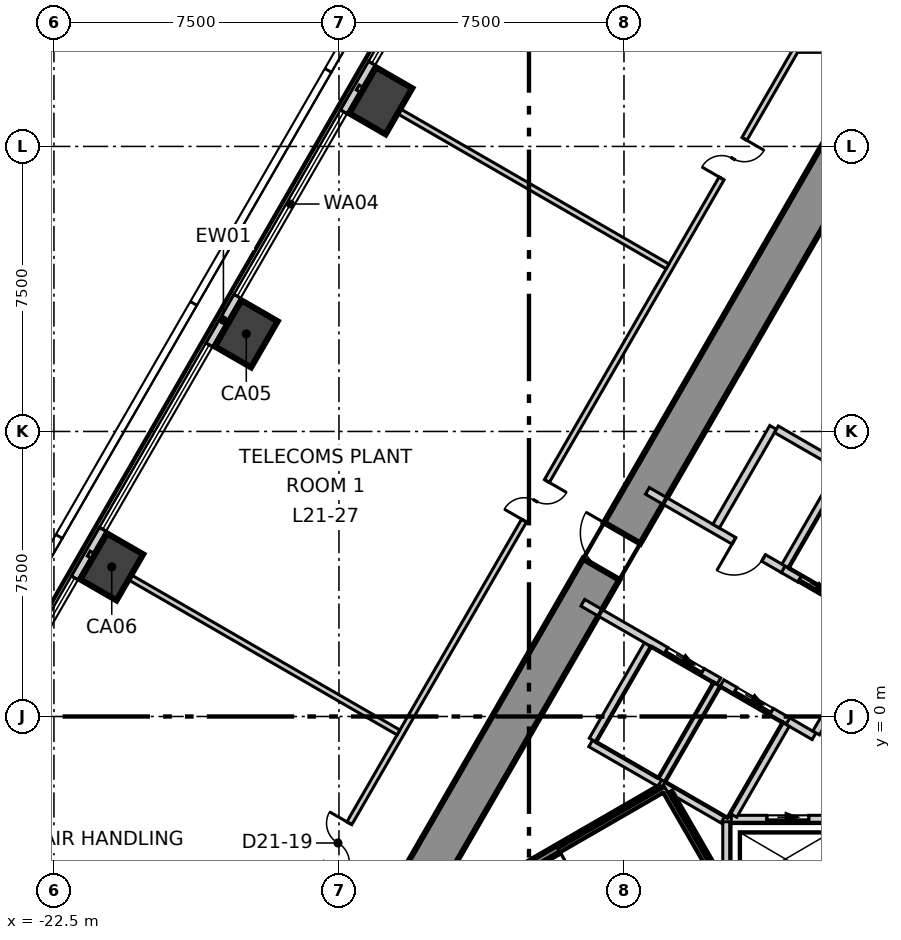
"""IFC4 building model, lengths in metres.
Left out: names, types, materials, properties, quantities, classifications, styles, units other than length and angle.
Written with IfcOpenShell. Run it as: python <this file> out.ifc"""

import sys

from ifc_helpers import new_model, si_unit, direction, frame, frame_2d, origin, origin_2d, place, context, subcontext, project, spatial, polyline, rectangle, outline, extrude, element, fill, save


model = new_model("IFC4")
c1 = context("Model", 3, precision=1e-05, world=origin(), true_north=direction((0.0, 1.0)))
c2 = subcontext(c1, "Body", "Model", "MODEL_VIEW")
j1 = project(units=[si_unit("LENGTHUNIT", "METRE"), si_unit("PLANEANGLEUNIT", "RADIAN")], contexts=[c1])
p1 = place(None, origin())
s1 = spatial("IfcSite", under=j1, at=p1, CompositionType="ELEMENT")
p2 = place(p1, origin())
s2 = spatial("IfcBuilding", under=s1, at=p2, CompositionType="ELEMENT")
p3 = place(p2, frame((0.0, 0.0, 95.3)))
s3 = spatial("IfcBuildingStorey", under=s2, at=p3, CompositionType="ELEMENT", Elevation=95.3)
p4 = place(p3, frame((-1.66, 15.025, -0.3), z_axis=(0.0, 0.0, 1.0), x_axis=(-0.500003780125, -0.866023221317, 0.0)))
e1 = element("IfcWall", 1, at=p4, inside=s3, PredefinedType="SHEAR", context=c2, shape_type="SweptSolid", body=[
    extrude(outline(polyline([(-0.462, -0.55), (1.483, -0.55), (3.428, -0.55), (5.374, -0.55), (7.319, -0.55), (9.264, -0.55), (11.209, -0.55), (13.155, -0.55), (15.1, -0.55), (17.045, -0.55), (18.99, -0.55), (20.936, -0.55), (22.881, -0.55), (24.826, -0.55), (23.902, 0.55), (21.949, 0.55), (19.995, 0.55), (18.042, 0.55), (16.089, 0.55), (14.135, 0.55), (12.182, 0.55), (10.229, 0.55), (8.275, 0.55), (6.322, 0.55), (4.369, 0.55), (2.415, 0.55), (0.462, 0.55), (-0.462, -0.55)])), origin(), (0.0, 0.0, 1.0), 4.2),
])
p5 = place(p4, frame((11.776, 0.0, 0.3)))
e2 = element("IfcOpeningElement", 2, at=p5, cuts=e1, PredefinedType="OPENING", context=c2, shape_type="SweptSolid", body=[
    extrude(rectangle(XDim=1.1, YDim=2.1, at=frame_2d((0.55, 1.05))), frame((0.0, 0.56, 0.0), z_axis=(0.0, -1.0, 0.0), x_axis=(1.0, 0.0, 0.0)), (0.0, 0.0, 1.0), 1.12),
])
for number, where, z_axis, x_axis in (
    (3, (-13.899, 16.2, -0.3), (0.0, 0.0, 1.0), (0.5, 0.866, 0.0)),
    (4, (-17.439, 10.068, -0.3), (0.0, 0.0, 1.0), (0.5, 0.866, 0.0)),
    (5, (-20.979, 3.937, -0.3), (0.0, 0.0, 1.0), (0.5, 0.866, 0.0)),
):
    element("IfcColumn", number, at=place(p3, frame(where, z_axis=z_axis, x_axis=x_axis)), inside=s3, PredefinedType="COLUMN", context=c2, shape_type="SweptSolid", body=[
        extrude(rectangle(XDim=1.4, YDim=1.1, at=origin_2d()), origin(), (0.0, 0.0, 1.0), 4.2),
    ])
p6 = place(p3, frame((-3.234, 36.072, 0.0), z_axis=(0.0, 0.0, 1.0), x_axis=(-0.500009108245, -0.866020145073, 0.0)))
e6 = element("IfcWall", 6, at=p6, inside=s3, PredefinedType="ELEMENTEDWALL", context=c2, shape_type="SweptSolid", body=[
    extrude(rectangle(XDim=59.225, YDim=0.2, at=frame_2d((29.613, 0.0))), origin(), (0.0, 0.0, 1.0), 3.9),
])
p7 = place(p6, frame((2.042, 0.0, 0.9)))
e7 = element("IfcOpeningElement", 7, at=p7, cuts=e6, PredefinedType="OPENING", context=c2, shape_type="SweptSolid", body=[
    extrude(rectangle(XDim=5.6, YDim=2.5, at=frame_2d((2.8, 1.25))), frame((0.0, 0.11, 0.0), z_axis=(0.0, -1.0, 0.0), x_axis=(1.0, 0.0, 0.0)), (0.0, 0.0, 1.0), 0.22),
])
p8 = place(p6, frame((9.122, 0.0, 0.9)))
e8 = element("IfcOpeningElement", 8, at=p8, cuts=e6, PredefinedType="OPENING", context=c2, shape_type="SweptSolid", body=[
    extrude(rectangle(XDim=5.6, YDim=2.5, at=frame_2d((2.8, 1.25))), frame((0.0, 0.11, 0.0), z_axis=(0.0, -1.0, 0.0), x_axis=(1.0, 0.0, 0.0)), (0.0, 0.0, 1.0), 0.22),
])
p9 = place(p6, frame((16.202, 0.0, 0.9)))
e9 = element("IfcOpeningElement", 9, at=p9, cuts=e6, PredefinedType="OPENING", context=c2, shape_type="SweptSolid", body=[
    extrude(rectangle(XDim=5.6, YDim=2.5, at=frame_2d((2.8, 1.25))), frame((0.0, 0.11, 0.0), z_axis=(0.0, -1.0, 0.0), x_axis=(1.0, 0.0, 0.0)), (0.0, 0.0, 1.0), 0.22),
])
p10 = place(p6, frame((23.282, 0.0, 0.9)))
e10 = element("IfcOpeningElement", 10, at=p10, cuts=e6, PredefinedType="OPENING", context=c2, shape_type="SweptSolid", body=[
    extrude(rectangle(XDim=5.6, YDim=2.5, at=frame_2d((2.8, 1.25))), frame((0.0, 0.11, 0.0), z_axis=(0.0, -1.0, 0.0), x_axis=(1.0, 0.0, 0.0)), (0.0, 0.0, 1.0), 0.22),
])
p11 = place(p6, frame((30.362, 0.0, 0.9)))
e11 = element("IfcOpeningElement", 11, at=p11, cuts=e6, PredefinedType="OPENING", context=c2, shape_type="SweptSolid", body=[
    extrude(rectangle(XDim=5.6, YDim=2.5, at=frame_2d((2.8, 1.25))), frame((0.0, 0.11, 0.0), z_axis=(0.0, -1.0, 0.0), x_axis=(1.0, 0.0, 0.0)), (0.0, 0.0, 1.0), 0.22),
])
p12 = place(p6, frame((37.442, 0.0, 0.9)))
e12 = element("IfcOpeningElement", 12, at=p12, cuts=e6, PredefinedType="OPENING", context=c2, shape_type="SweptSolid", body=[
    extrude(rectangle(XDim=5.6, YDim=2.5, at=frame_2d((2.8, 1.25))), frame((0.0, 0.11, 0.0), z_axis=(0.0, -1.0, 0.0), x_axis=(1.0, 0.0, 0.0)), (0.0, 0.0, 1.0), 0.22),
])
p13 = place(p6, frame((44.522, 0.0, 0.9)))
e13 = element("IfcOpeningElement", 13, at=p13, cuts=e6, PredefinedType="OPENING", context=c2, shape_type="SweptSolid", body=[
    extrude(rectangle(XDim=5.6, YDim=2.5, at=frame_2d((2.8, 1.25))), frame((0.0, 0.11, 0.0), z_axis=(0.0, -1.0, 0.0), x_axis=(1.0, 0.0, 0.0)), (0.0, 0.0, 1.0), 0.22),
])
p14 = place(p6, frame((51.602, 0.0, 0.9)))
e14 = element("IfcOpeningElement", 14, at=p14, cuts=e6, PredefinedType="OPENING", context=c2, shape_type="SweptSolid", body=[
    extrude(rectangle(XDim=5.6, YDim=2.5, at=frame_2d((2.8, 1.25))), frame((0.0, 0.11, 0.0), z_axis=(0.0, -1.0, 0.0), x_axis=(1.0, 0.0, 0.0)), (0.0, 0.0, 1.0), 0.22),
])
p15 = place(p3, frame((-16.685, -6.2, 0.0), z_axis=(0.0, 0.0, 1.0), x_axis=(0.500002442456, 0.866023993627, 0.0)))
e15 = element("IfcWall", 15, at=p15, inside=s3, PredefinedType="PARTITIONING", context=c2, shape_type="SweptSolid", body=[
    extrude(rectangle(XDim=27.424, YDim=0.15, at=frame_2d((13.712, 0.0))), origin(), (0.0, 0.0, 1.0), 3.9),
])
p16 = place(p15, frame((23.508, 0.0, 0.0)))
e16 = element("IfcOpeningElement", 16, at=p16, cuts=e15, PredefinedType="OPENING", context=c2, shape_type="SweptSolid", body=[
    extrude(rectangle(XDim=1.2, YDim=2.1, at=frame_2d((0.6, 1.05))), frame((0.0, 0.085, 0.0), z_axis=(0.0, -1.0, 0.0), x_axis=(1.0, 0.0, 0.0)), (0.0, 0.0, 1.0), 0.17),
])
p17 = place(p15, frame((13.112, 0.0, 0.0)))
e17 = element("IfcOpeningElement", 17, at=p17, cuts=e15, PredefinedType="OPENING", context=c2, shape_type="SweptSolid", body=[
    extrude(rectangle(XDim=1.2, YDim=2.1, at=frame_2d((0.6, 1.05))), frame((0.0, 0.085, 0.0), z_axis=(0.0, -1.0, 0.0), x_axis=(1.0, 0.0, 0.0)), (0.0, 0.0, 1.0), 0.17),
])
p18 = place(p15, frame((2.716, 0.0, 0.0)))
e18 = element("IfcOpeningElement", 18, at=p18, cuts=e15, PredefinedType="OPENING", context=c2, shape_type="SweptSolid", body=[
    extrude(rectangle(XDim=1.2, YDim=2.1, at=frame_2d((0.6, 1.05))), frame((0.0, 0.085, 0.0), z_axis=(0.0, -1.0, 0.0), x_axis=(1.0, 0.0, 0.0)), (0.0, 0.0, 1.0), 0.17),
])
for number, where, z_axis, x_axis in (
    (19, (-21.585, 4.287, 0.0), (0.0, 0.0, 1.0), (0.866, -0.5, 0.0)),
    (20, (-14.505, 16.55, 0.0), (0.0, 0.0, 1.0), (0.866, -0.5, 0.0)),
):
    element("IfcWall", number, at=place(p3, frame(where, z_axis=z_axis, x_axis=x_axis)), inside=s3, PredefinedType="PARTITIONING", context=c2, shape_type="SweptSolid", body=[
        extrude(rectangle(XDim=9.412, YDim=0.15, at=frame_2d((4.706, 0.0))), origin(), (0.0, 0.0, 1.0), 3.9),
    ])
p19 = place(p3, frame((-2.887, 17.55, 0.0), z_axis=(0.0, 0.0, 1.0), x_axis=(1.0, 0.0, 0.0)))
e21 = element("IfcWall", 21, at=p19, inside=s3, PredefinedType="PARTITIONING", context=c2, shape_type="SweptSolid", body=[
    extrude(rectangle(XDim=0.813, YDim=0.15, at=frame_2d((0.406, 0.0))), origin(), (0.0, 0.0, 1.0), 3.9),
])
p20 = place(p3, frame((-8.376, -0.707, 0.0), z_axis=(0.0, 0.0, 1.0), x_axis=(0.866067520717, -0.499927044236, 0.0)))
e22 = element("IfcWall", 22, at=p20, inside=s3, PredefinedType="SOLIDWALL", context=c2, shape_type="SweptSolid", body=[
    extrude(rectangle(XDim=2.1, YDim=0.2, at=frame_2d((1.05, 0.0))), origin(), (0.0, 0.0, 1.0), 3.9),
])
p21 = place(p3, frame((-8.326, -0.62, 0.0), z_axis=(0.0, 0.0, 1.0), x_axis=(0.500023687443, 0.866011727401, 0.0)))
e23 = element("IfcWall", 23, at=p21, inside=s3, PredefinedType="SOLIDWALL", context=c2, shape_type="SweptSolid", body=[
    extrude(rectangle(XDim=2.9, YDim=0.2, at=frame_2d((1.45, 0.0))), origin(), (0.0, 0.0, 1.0), 3.9),
])
p22 = place(p3, frame((-4.8, -6.9, 0.0), z_axis=(0.0, 0.0, 1.0), x_axis=(0.0, 1.0, 0.0)))
e24 = element("IfcWall", 24, at=p22, inside=s3, PredefinedType="SOLIDWALL", context=c2, shape_type="SweptSolid", body=[
    extrude(rectangle(XDim=4.131, YDim=0.2, at=frame_2d((2.065, 0.0))), origin(), (0.0, 0.0, 1.0), 3.9),
])
p23 = place(p3, frame((-4.676, -2.7, 0.0), z_axis=(0.0, 0.0, 1.0), x_axis=(1.0, 0.0, 0.0)))
e25 = element("IfcWall", 25, at=p23, inside=s3, PredefinedType="SOLIDWALL", context=c2, shape_type="SweptSolid", body=[
    extrude(rectangle(XDim=2.873, YDim=0.2, at=frame_2d((1.437, 0.0))), origin(), (0.0, 0.0, 1.0), 3.9),
])
p24 = place(p23, frame((0.937, 0.0, 0.0)))
e26 = element("IfcOpeningElement", 26, at=p24, cuts=e25, PredefinedType="OPENING", context=c2, shape_type="SweptSolid", body=[
    extrude(rectangle(XDim=1.1, YDim=2.1, at=frame_2d((0.55, 1.05))), frame((0.0, 0.11, 0.0), z_axis=(0.0, -1.0, 0.0), x_axis=(1.0, 0.0, 0.0)), (0.0, 0.0, 1.0), 0.22),
])
p25 = place(p3, frame((-8.584, 2.993, 0.0), z_axis=(0.0, 0.0, 1.0), x_axis=(0.866075409494, -0.499913377567, 0.0)))
e27 = element("IfcWall", 27, at=p25, inside=s3, PredefinedType="SOLIDWALL", context=c2, shape_type="SweptSolid", body=[
    extrude(rectangle(XDim=4.133, YDim=0.2, at=frame_2d((2.066, 0.0))), origin(), (0.0, 0.0, 1.0), 3.9),
])
p26 = place(p25, frame((2.53, 0.0, 0.0)))
e28 = element("IfcOpeningElement", 28, at=p26, cuts=e27, PredefinedType="OPENING", context=c2, shape_type="SweptSolid", body=[
    extrude(rectangle(XDim=1.1, YDim=2.1, at=frame_2d((0.55, 1.05))), frame((0.0, 0.11, 0.0), z_axis=(0.0, -1.0, 0.0), x_axis=(1.0, 0.0, 0.0)), (0.0, 0.0, 1.0), 0.22),
])
p27 = place(p3, frame((-3.188, -0.122, 0.0), z_axis=(0.0, 0.0, 1.0), x_axis=(0.865705793592, -0.50055317294, 0.0)))
e29 = element("IfcWall", 29, at=p27, inside=s3, PredefinedType="SOLIDWALL", context=c2, shape_type="SweptSolid", body=[
    extrude(rectangle(XDim=0.797, YDim=0.2, at=frame_2d((0.398, 0.0))), origin(), (0.0, 0.0, 1.0), 3.9),
])
p28 = place(p3, frame((-6.884, 5.937, 0.0), z_axis=(0.0, 0.0, 1.0), x_axis=(0.866075409494, -0.499913377567, 0.0)))
e30 = element("IfcWall", 30, at=p28, inside=s3, PredefinedType="SOLIDWALL", context=c2, shape_type="SweptSolid", body=[
    extrude(rectangle(XDim=4.133, YDim=0.2, at=frame_2d((2.066, 0.0))), origin(), (0.0, 0.0, 1.0), 3.9),
])
p29 = place(p28, frame((2.63, 0.0, 0.0)))
e31 = element("IfcOpeningElement", 31, at=p29, cuts=e30, PredefinedType="OPENING", context=c2, shape_type="SweptSolid", body=[
    extrude(rectangle(XDim=0.9, YDim=2.1, at=frame_2d((0.45, 1.05))), frame((0.0, 0.11, 0.0), z_axis=(0.0, -1.0, 0.0), x_axis=(1.0, 0.0, 0.0)), (0.0, 0.0, 1.0), 0.22),
])
p30 = place(p3, frame((-5.076, 5.009, 0.0), z_axis=(0.0, 0.0, 1.0), x_axis=(0.50002537861, 0.866010750942, 0.0)))
e32 = element("IfcWall", 32, at=p30, inside=s3, PredefinedType="SOLIDWALL", context=c2, shape_type="SweptSolid", body=[
    extrude(rectangle(XDim=3.0, YDim=0.2, at=frame_2d((1.5, 0.0))), origin(), (0.0, 0.0, 1.0), 3.9),
])
p31 = place(p3, frame((-3.489, 7.557, 0.0), z_axis=(0.0, 0.0, 1.0), x_axis=(0.866010750942, -0.50002537861, 0.0)))
e33 = element("IfcWall", 33, at=p31, inside=s3, PredefinedType="SOLIDWALL", context=c2, shape_type="SweptSolid", body=[
    extrude(rectangle(XDim=2.0, YDim=0.2, at=frame_2d((1.0, 0.0))), origin(), (0.0, 0.0, 1.0), 3.9),
])
p32 = place(p3, frame((-2.444, -0.433, 0.0), z_axis=(0.0, 0.0, 1.0), x_axis=(0.500035624827, 0.866004834804, 0.0)))
e34 = element("IfcWall", 34, at=p32, inside=s3, PredefinedType="SOLIDWALL", context=c2, shape_type="SweptSolid", body=[
    extrude(rectangle(XDim=3.194, YDim=0.2, at=frame_2d((1.597, 0.0))), origin(), (0.0, 0.0, 1.0), 3.9),
])
p33 = place(p3, frame((-6.507, -1.67, 0.0), z_axis=(0.0, 0.0, 1.0), x_axis=(0.50012328804, 0.865954211699, 0.0)))
e35 = element("IfcWall", 35, at=p33, inside=s3, PredefinedType="SOLIDWALL", context=c2, shape_type="SweptSolid", body=[
    extrude(rectangle(XDim=2.9, YDim=0.2, at=frame_2d((1.45, 0.0))), origin(), (0.0, 0.0, 1.0), 3.9),
])
p34 = place(p3, frame((-6.47, -1.807, 0.0), z_axis=(0.0, 0.0, 1.0), x_axis=(0.865883195159, -0.500246231712, 0.0)))
e36 = element("IfcWall", 36, at=p34, inside=s3, PredefinedType="SOLIDWALL", context=c2, shape_type="SweptSolid", body=[
    extrude(rectangle(XDim=1.815, YDim=0.2, at=frame_2d((0.908, 0.0))), origin(), (0.0, 0.0, 1.0), 3.9),
])
p35 = place(p3, frame((-4.922, 0.879, 0.0), z_axis=(0.0, 0.0, 1.0), x_axis=(0.866073918653, -0.499915960366, 0.0)))
e37 = element("IfcWall", 37, at=p35, inside=s3, PredefinedType="SOLIDWALL", context=c2, shape_type="SweptSolid", body=[
    extrude(rectangle(XDim=2.002, YDim=0.2, at=frame_2d((1.001, 0.0))), origin(), (0.0, 0.0, 1.0), 3.9),
])
p36 = place(p35, frame((0.402, 0.0, 0.0)))
e38 = element("IfcOpeningElement", 38, at=p36, cuts=e37, PredefinedType="OPENING", context=c2, shape_type="SweptSolid", body=[
    extrude(rectangle(XDim=1.1, YDim=2.1, at=frame_2d((0.55, 1.05))), frame((0.0, 0.11, 0.0), z_axis=(0.0, -1.0, 0.0), x_axis=(1.0, 0.0, 0.0)), (0.0, 0.0, 1.0), 0.22),
])
p37 = place(p3, frame((-4.619, -2.6, 0.0), z_axis=(0.0, 0.0, 1.0), x_axis=(0.50009492287, 0.865970593103, 0.0)))
e39 = element("IfcWall", 39, at=p37, inside=s3, PredefinedType="SOLIDWALL", context=c2, shape_type="SweptSolid", body=[
    extrude(rectangle(XDim=2.761, YDim=0.2, at=frame_2d((1.381, 0.0))), origin(), (0.0, 0.0, 1.0), 3.9),
])
p38 = place(p3, frame((-3.309, 3.873, 0.0), z_axis=(0.0, 0.0, 1.0), x_axis=(0.866098583652, -0.499873227325, 0.0)))
e40 = element("IfcWall", 40, at=p38, inside=s3, PredefinedType="SOLIDWALL", context=c2, shape_type="SweptSolid", body=[
    extrude(rectangle(XDim=2.103, YDim=0.2, at=frame_2d((1.051, 0.0))), origin(), (0.0, 0.0, 1.0), 3.9),
])
p39 = place(p38, frame((0.502, 0.0, 0.0)))
e41 = element("IfcOpeningElement", 41, at=p39, cuts=e40, PredefinedType="OPENING", context=c2, shape_type="SweptSolid", body=[
    extrude(rectangle(XDim=1.1, YDim=2.1, at=frame_2d((0.55, 1.05))), frame((0.0, 0.11, 0.0), z_axis=(0.0, -1.0, 0.0), x_axis=(1.0, 0.0, 0.0)), (0.0, 0.0, 1.0), 0.22),
])
p40 = place(p3, frame((-3.257, 3.959, 0.0), z_axis=(0.0, 0.0, 1.0), x_axis=(0.50012328804, 0.865954211699, 0.0)))
e42 = element("IfcWall", 42, at=p40, inside=s3, PredefinedType="SOLIDWALL", context=c2, shape_type="SweptSolid", body=[
    extrude(rectangle(XDim=2.9, YDim=0.2, at=frame_2d((1.45, 0.0))), origin(), (0.0, 0.0, 1.0), 3.9),
])
p41 = place(p3, frame((-13.867, -6.159, 0.0), z_axis=(0.0, 0.0, 1.0), x_axis=(0.866010926821, 0.500025073997, 0.0)))
e43 = element("IfcWall", 43, at=p41, inside=s3, PredefinedType="SOLIDWALL", context=c2, shape_type="SweptSolid", body=[
    extrude(rectangle(XDim=8.473, YDim=0.2, at=frame_2d((4.237, 0.0))), origin(), (0.0, 0.0, 1.0), 3.9),
])
p42 = place(p3, frame((-6.329, -2.038, 0.0), z_axis=(0.0, 0.0, 1.0), x_axis=(0.500200581029, -0.865909567298, 0.0)))
e44 = element("IfcWall", 44, at=p42, inside=s3, PredefinedType="SOLIDWALL", context=c2, shape_type="SweptSolid", body=[
    extrude(rectangle(XDim=2.799, YDim=0.2, at=frame_2d((1.399, 0.0))), origin(), (0.0, 0.0, 1.0), 3.9),
])
p43 = place(p9, origin())
e45 = element("IfcWindow", 45, at=p43, inside=s3, PartitioningType="SINGLE_PANEL", PredefinedType="WINDOW", context=c2, shape_type="SweptSolid", body=[
    extrude(rectangle(XDim=5.6, YDim=2.5, at=frame_2d((2.8, 1.25))), frame((0.0, 0.03, 0.0), z_axis=(0.0, -1.0, 0.0), x_axis=(1.0, 0.0, 0.0)), (0.0, 0.0, 1.0), 0.06),
])
fill(e9, e45)
p44 = place(p10, origin())
e46 = element("IfcWindow", 46, at=p44, inside=s3, PartitioningType="SINGLE_PANEL", PredefinedType="WINDOW", context=c2, shape_type="SweptSolid", body=[
    extrude(rectangle(XDim=5.6, YDim=2.5, at=frame_2d((2.8, 1.25))), frame((0.0, 0.03, 0.0), z_axis=(0.0, -1.0, 0.0), x_axis=(1.0, 0.0, 0.0)), (0.0, 0.0, 1.0), 0.06),
])
fill(e10, e46)
p45 = place(p11, origin())
e47 = element("IfcWindow", 47, at=p45, inside=s3, PartitioningType="SINGLE_PANEL", PredefinedType="WINDOW", context=c2, shape_type="SweptSolid", body=[
    extrude(rectangle(XDim=5.6, YDim=2.5, at=frame_2d((2.8, 1.25))), frame((0.0, 0.03, 0.0), z_axis=(0.0, -1.0, 0.0), x_axis=(1.0, 0.0, 0.0)), (0.0, 0.0, 1.0), 0.06),
])
fill(e11, e47)
p46 = place(p12, origin())
e48 = element("IfcWindow", 48, at=p46, inside=s3, PartitioningType="SINGLE_PANEL", PredefinedType="WINDOW", context=c2, shape_type="SweptSolid", body=[
    extrude(rectangle(XDim=5.6, YDim=2.5, at=frame_2d((2.8, 1.25))), frame((0.0, 0.03, 0.0), z_axis=(0.0, -1.0, 0.0), x_axis=(1.0, 0.0, 0.0)), (0.0, 0.0, 1.0), 0.06),
])
fill(e12, e48)
p47 = place(p24, origin())
e49 = element("IfcDoor", 49, at=p47, inside=s3, OperationType="SLIDING_TO_LEFT", PredefinedType="DOOR", context=c2, shape_type="SweptSolid", body=[
    extrude(rectangle(XDim=1.1, YDim=2.1, at=frame_2d((0.55, 1.05))), frame((0.0, 0.025, 0.0), z_axis=(0.0, -1.0, 0.0), x_axis=(1.0, 0.0, 0.0)), (0.0, 0.0, 1.0), 0.05),
])
fill(e26, e49)
p48 = place(p36, origin())
e50 = element("IfcDoor", 50, at=p48, inside=s3, OperationType="SLIDING_TO_LEFT", PredefinedType="DOOR", context=c2, shape_type="SweptSolid", body=[
    extrude(rectangle(XDim=1.1, YDim=2.1, at=frame_2d((0.55, 1.05))), frame((0.0, 0.025, 0.0), z_axis=(0.0, -1.0, 0.0), x_axis=(1.0, 0.0, 0.0)), (0.0, 0.0, 1.0), 0.05),
])
fill(e38, e50)
p49 = place(p39, origin())
e51 = element("IfcDoor", 51, at=p49, inside=s3, OperationType="SLIDING_TO_LEFT", PredefinedType="DOOR", context=c2, shape_type="SweptSolid", body=[
    extrude(rectangle(XDim=1.1, YDim=2.1, at=frame_2d((0.55, 1.05))), frame((0.0, 0.025, 0.0), z_axis=(0.0, -1.0, 0.0), x_axis=(1.0, 0.0, 0.0)), (0.0, 0.0, 1.0), 0.05),
])
fill(e41, e51)
p50 = place(p26, origin())
e52 = element("IfcDoor", 52, at=p50, inside=s3, OperationType="SLIDING_TO_LEFT", PredefinedType="DOOR", context=c2, shape_type="SweptSolid", body=[
    extrude(rectangle(XDim=1.1, YDim=2.1, at=frame_2d((0.55, 1.05))), frame((0.0, 0.025, 0.0), z_axis=(0.0, -1.0, 0.0), x_axis=(1.0, 0.0, 0.0)), (0.0, 0.0, 1.0), 0.05),
])
fill(e28, e52)
p51 = place(p29, origin())
e53 = element("IfcDoor", 53, at=p51, inside=s3, OperationType="SINGLE_SWING_LEFT", PredefinedType="DOOR", context=c2, shape_type="SweptSolid", body=[
    extrude(rectangle(XDim=0.9, YDim=2.1, at=frame_2d((0.45, 1.05))), frame((0.0, 0.025, 0.0), z_axis=(0.0, -1.0, 0.0), x_axis=(1.0, 0.0, 0.0)), (0.0, 0.0, 1.0), 0.05),
])
fill(e31, e53)
p52 = place(p16, origin())
e54 = element("IfcDoor", 54, at=p52, inside=s3, OperationType="DOUBLE_DOOR_SINGLE_SWING", PredefinedType="DOOR", context=c2, shape_type="SweptSolid", body=[
    extrude(rectangle(XDim=1.2, YDim=2.1, at=frame_2d((0.6, 1.05))), frame((0.0, 0.025, 0.0), z_axis=(0.0, -1.0, 0.0), x_axis=(1.0, 0.0, 0.0)), (0.0, 0.0, 1.0), 0.05),
])
fill(e16, e54)
p53 = place(p17, origin())
e55 = element("IfcDoor", 55, at=p53, inside=s3, OperationType="DOUBLE_DOOR_SINGLE_SWING", PredefinedType="DOOR", context=c2, shape_type="SweptSolid", body=[
    extrude(rectangle(XDim=1.2, YDim=2.1, at=frame_2d((0.6, 1.05))), frame((0.0, 0.025, 0.0), z_axis=(0.0, -1.0, 0.0), x_axis=(1.0, 0.0, 0.0)), (0.0, 0.0, 1.0), 0.05),
])
fill(e17, e55)
p54 = place(p18, origin())
e56 = element("IfcDoor", 56, at=p54, inside=s3, OperationType="DOUBLE_DOOR_SINGLE_SWING", PredefinedType="DOOR", context=c2, shape_type="SweptSolid", body=[
    extrude(rectangle(XDim=1.2, YDim=2.1, at=frame_2d((0.6, 1.05))), frame((0.0, 0.025, 0.0), z_axis=(0.0, -1.0, 0.0), x_axis=(1.0, 0.0, 0.0)), (0.0, 0.0, 1.0), 0.05),
])
fill(e18, e56)
p55 = place(p5, origin())
e57 = element("IfcDoor", 57, at=p55, inside=s3, OperationType="SINGLE_SWING_LEFT", PredefinedType="DOOR", context=c2, shape_type="SweptSolid", body=[
    extrude(rectangle(XDim=1.1, YDim=2.1, at=frame_2d((0.55, 1.05))), frame((0.0, 0.025, 0.0), z_axis=(0.0, -1.0, 0.0), x_axis=(1.0, 0.0, 0.0)), (0.0, 0.0, 1.0), 0.05),
])
fill(e2, e57)
save(model, sys.argv[1])
